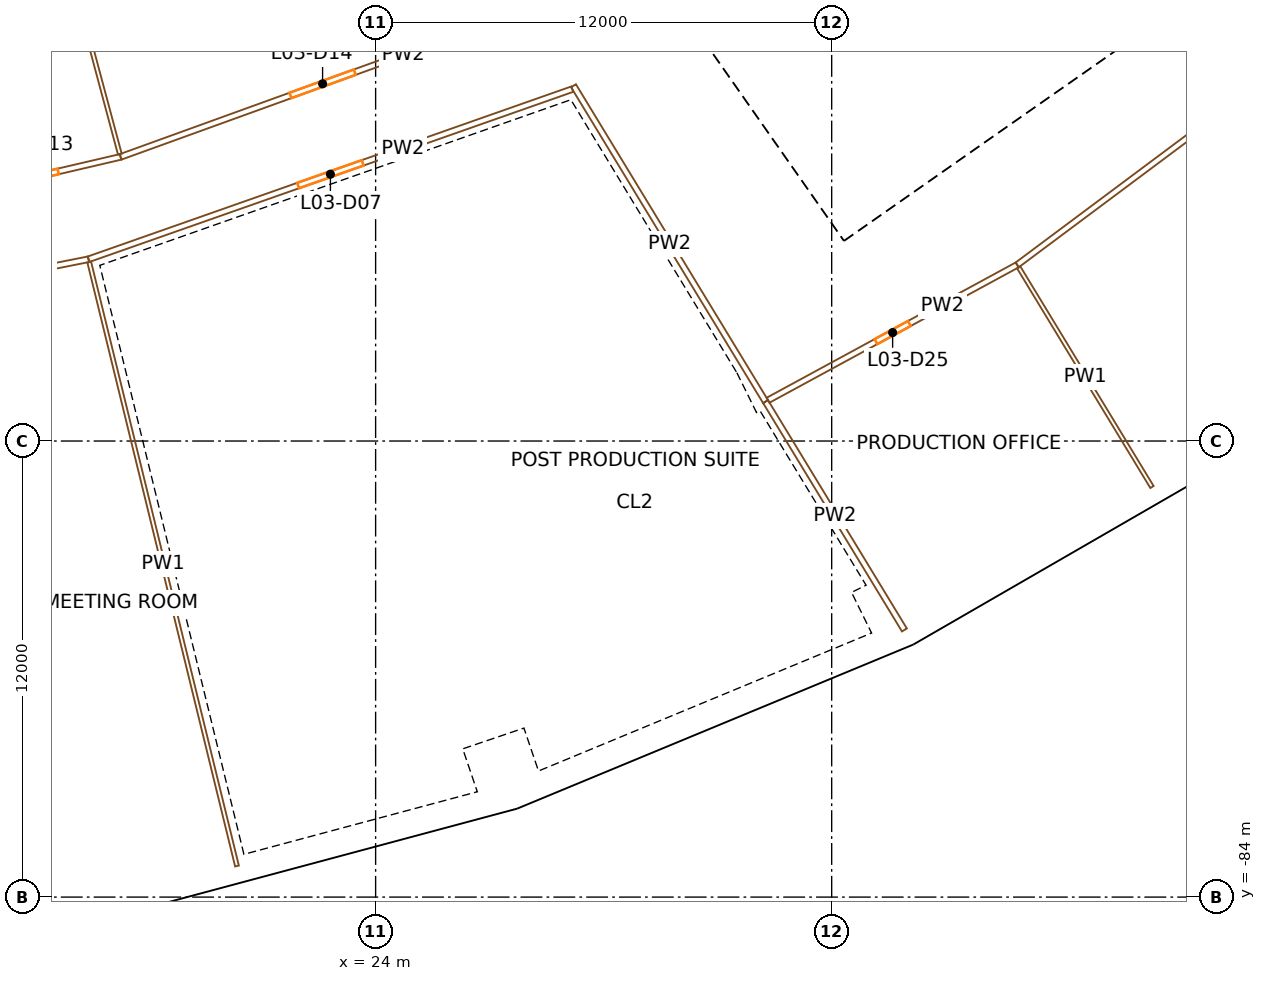
"""IFC4 building model, lengths in metres.
Left out: names, types, materials, properties, quantities, classifications, styles, units other than length and angle.
Written with IfcOpenShell. Run it as: python <this file> out.ifc"""

import sys

from ifc_helpers import new_model, si_unit, direction, frame, frame_2d, origin, origin_2d, place, context, subcontext, project, spatial, rectangle, extrude, element, fill, save


model = new_model("IFC4")
c1 = context("Model", 3, precision=1e-05, world=origin(), true_north=direction((0.0, 1.0)))
c2 = subcontext(c1, "Body", "Model", "MODEL_VIEW")
j1 = project(units=[si_unit("LENGTHUNIT", "METRE"), si_unit("PLANEANGLEUNIT", "RADIAN")], contexts=[c1])
p1 = place(None, origin())
s1 = spatial("IfcSite", under=j1, at=p1, CompositionType="ELEMENT")
p2 = place(p1, origin())
s2 = spatial("IfcBuilding", under=s1, at=p2, CompositionType="ELEMENT")
p3 = place(p2, frame((0.0, 0.0, 27.0)))
s3 = spatial("IfcBuildingStorey", under=s2, at=p3, CompositionType="ELEMENT", Elevation=27.0)
p4 = place(p3, frame((15.168, -76.256, 0.0), z_axis=(0.0, 0.0, 1.0), x_axis=(0.980785280403, 0.195090322016, 0.0)))
e1 = element("IfcColumn", 1, at=p4, inside=s3, PredefinedType="COLUMN", context=c2, shape_type="SweptSolid", body=[
    extrude(rectangle(XDim=1.4, YDim=1.8, at=origin_2d()), origin(), (0.0, 0.0, 1.0), 4.5),
])
p5 = place(p3, frame((16.631, -83.612, 0.0), z_axis=(0.0, 0.0, 1.0), x_axis=(0.980785280403, 0.195090322016, 0.0)))
e2 = element("IfcColumn", 2, at=p5, inside=s3, PredefinedType="COLUMN", context=c2, shape_type="SweptSolid", body=[
    extrude(rectangle(XDim=1.1, YDim=1.3, at=origin_2d()), origin(), (0.0, 0.0, 1.0), 4.5),
])
p6 = place(p3, frame((24.992, -73.624, 0.0), z_axis=(0.0, 0.0, 1.0), x_axis=(0.946930129495, 0.321439465303, 0.0)))
e3 = element("IfcColumn", 3, at=p6, inside=s3, PredefinedType="COLUMN", context=c2, shape_type="SweptSolid", body=[
    extrude(rectangle(XDim=1.4, YDim=1.8, at=origin_2d()), origin(), (0.0, 0.0, 1.0), 4.5),
])
p7 = place(p3, frame((27.403, -80.726, 0.0), z_axis=(0.0, 0.0, 1.0), x_axis=(0.946930129495, 0.321439465303, 0.0)))
e4 = element("IfcColumn", 4, at=p7, inside=s3, PredefinedType="COLUMN", context=c2, shape_type="SweptSolid", body=[
    extrude(rectangle(XDim=1.1, YDim=1.3, at=origin_2d()), origin(), (0.0, 0.0, 1.0), 4.5),
])
p8 = place(p3, frame((34.388, -69.732, 0.0), z_axis=(0.0, 0.0, 1.0), x_axis=(0.896872741533, 0.442288690219, 0.0)))
e5 = element("IfcColumn", 5, at=p8, inside=s3, PredefinedType="COLUMN", context=c2, shape_type="SweptSolid", body=[
    extrude(rectangle(XDim=1.4, YDim=1.8, at=origin_2d()), origin(), (0.0, 0.0, 1.0), 4.5),
])
p9 = place(p3, frame((37.705, -76.458, 0.0), z_axis=(0.0, 0.0, 1.0), x_axis=(0.896872741533, 0.442288690219, 0.0)))
e6 = element("IfcColumn", 6, at=p9, inside=s3, PredefinedType="COLUMN", context=c2, shape_type="SweptSolid", body=[
    extrude(rectangle(XDim=1.1, YDim=1.3, at=origin_2d()), origin(), (0.0, 0.0, 1.0), 4.5),
])
p10 = place(p3, frame((43.196, -64.647, 0.0), z_axis=(0.0, 0.0, 1.0), x_axis=(0.831469612303, 0.55557023302, 0.0)))
e7 = element("IfcColumn", 7, at=p10, inside=s3, PredefinedType="COLUMN", context=c2, shape_type="SweptSolid", body=[
    extrude(rectangle(XDim=1.4, YDim=1.8, at=origin_2d()), origin(), (0.0, 0.0, 1.0), 4.5),
])
p11 = place(p3, frame((36.717, -66.337, 0.0), z_axis=(0.0, 0.0, 1.0), x_axis=(-0.573577477574, 0.819151315216, 0.0)))
e8 = element("IfcWall", 8, at=p11, inside=s3, PredefinedType="SHEAR", context=c2, shape_type="SweptSolid", body=[
    extrude(rectangle(XDim=14.8, YDim=0.9, at=frame_2d((7.4, 0.0))), origin(), (0.0, 0.0, 1.0), 4.1),
])
p12 = place(p11, frame((6.2, 0.0, 0.0)))
e9 = element("IfcOpeningElement", 9, at=p12, cuts=e8, PredefinedType="OPENING", context=c2, shape_type="SweptSolid", body=[
    extrude(rectangle(XDim=2.4, YDim=2.1, at=frame_2d((1.2, 1.05))), frame((0.0, 0.46, 0.0), z_axis=(0.0, -1.0, 0.0), x_axis=(1.0, 0.0, 0.0)), (0.0, 0.0, 1.0), 0.92),
])
p13 = place(p3, frame((36.827, -65.71, 0.0), z_axis=(0.0, 0.0, 1.0), x_axis=(0.819153391756, 0.573574511963, 0.0)))
e10 = element("IfcWall", 10, at=p13, inside=s3, PredefinedType="SHEAR", context=c2, shape_type="SweptSolid", body=[
    extrude(rectangle(XDim=15.045, YDim=0.9, at=frame_2d((7.523, 0.0))), origin(), (0.0, 0.0, 1.0), 4.1),
])
p14 = place(p13, frame((1.05, 0.0, 0.0)))
e11 = element("IfcOpeningElement", 11, at=p14, cuts=e10, PredefinedType="OPENING", context=c2, shape_type="SweptSolid", body=[
    extrude(rectangle(XDim=1.0, YDim=2.1, at=frame_2d((0.5, 1.05))), frame((0.0, 0.46, 0.0), z_axis=(0.0, -1.0, 0.0), x_axis=(1.0, 0.0, 0.0)), (0.0, 0.0, 1.0), 0.92),
])
p15 = place(p13, frame((3.625, 0.0, 0.0)))
e12 = element("IfcOpeningElement", 12, at=p15, cuts=e10, PredefinedType="OPENING", context=c2, shape_type="SweptSolid", body=[
    extrude(rectangle(XDim=1.0, YDim=2.1, at=frame_2d((0.5, 1.05))), frame((0.0, 0.46, 0.0), z_axis=(0.0, -1.0, 0.0), x_axis=(1.0, 0.0, 0.0)), (0.0, 0.0, 1.0), 0.92),
])
p16 = place(p13, frame((6.075, 0.0, 0.0)))
e13 = element("IfcOpeningElement", 13, at=p16, cuts=e10, PredefinedType="OPENING", context=c2, shape_type="SweptSolid", body=[
    extrude(rectangle(XDim=1.0, YDim=2.1, at=frame_2d((0.5, 1.05))), frame((0.0, 0.46, 0.0), z_axis=(0.0, -1.0, 0.0), x_axis=(1.0, 0.0, 0.0)), (0.0, 0.0, 1.0), 0.92),
])
p17 = place(p13, frame((13.495, 0.0, 0.0)))
e14 = element("IfcOpeningElement", 14, at=p17, cuts=e10, PredefinedType="OPENING", context=c2, shape_type="SweptSolid", body=[
    extrude(rectangle(XDim=1.1, YDim=2.1, at=frame_2d((0.55, 1.05))), frame((0.0, 0.46, 0.0), z_axis=(0.0, -1.0, 0.0), x_axis=(1.0, 0.0, 0.0)), (0.0, 0.0, 1.0), 0.92),
])
p18 = place(p3, frame((35.221, -63.417, 0.0), z_axis=(0.0, 0.0, 1.0), x_axis=(0.819166993208, 0.573555086491, 0.0)))
e15 = element("IfcWall", 15, at=p18, inside=s3, PredefinedType="SOLIDWALL", context=c2, shape_type="SweptSolid", body=[
    extrude(rectangle(XDim=7.95, YDim=0.3, at=frame_2d((3.975, 0.0))), origin(), (0.0, 0.0, 1.0), 4.1),
])
p19 = place(p3, frame((37.929, -61.704, 0.0), z_axis=(0.0, 0.0, 1.0), x_axis=(0.573559170999, -0.819164133348, 0.0)))
e16 = element("IfcWall", 16, at=p19, inside=s3, PredefinedType="PLUMBINGWALL", context=c2, shape_type="SweptSolid", body=[
    extrude(rectangle(XDim=2.2, YDim=0.1, at=frame_2d((1.1, 0.0))), origin(), (0.0, 0.0, 1.0), 4.1),
])
p20 = place(p3, frame((39.485, -60.614, 0.0), z_axis=(0.0, 0.0, 1.0), x_axis=(0.573507030513, -0.819200638399, 0.0)))
e17 = element("IfcWall", 17, at=p20, inside=s3, PredefinedType="PLUMBINGWALL", context=c2, shape_type="SweptSolid", body=[
    extrude(rectangle(XDim=2.2, YDim=0.1, at=frame_2d((1.1, 0.0))), origin(), (0.0, 0.0, 1.0), 4.1),
])
p21 = place(p3, frame((16.754, -84.379, 0.0), z_axis=(0.0, 0.0, 1.0), x_axis=(0.965923678926, 0.258827059038, 0.0)))
e18 = element("IfcWall", 18, at=p21, inside=s3, PredefinedType="SOLIDWALL", context=c2, shape_type="SweptSolid", body=[
    extrude(rectangle(XDim=11.312, YDim=0.45, at=frame_2d((5.656, 0.0))), origin(), (0.0, 0.0, 1.0), 3.2),
])
p22 = place(p21, frame((4.006, 0.0, 0.9)))
e19 = element("IfcOpeningElement", 19, at=p22, cuts=e18, PredefinedType="OPENING", context=c2, shape_type="SweptSolid", body=[
    extrude(rectangle(XDim=1.2, YDim=2.15, at=frame_2d((0.6, 1.075))), frame((0.0, 0.235, 0.0), z_axis=(0.0, -1.0, 0.0), x_axis=(1.0, 0.0, 0.0)), (0.0, 0.0, 1.0), 0.47),
])
p23 = place(p21, frame((6.106, 0.0, 0.9)))
e20 = element("IfcOpeningElement", 20, at=p23, cuts=e18, PredefinedType="OPENING", context=c2, shape_type="SweptSolid", body=[
    extrude(rectangle(XDim=1.2, YDim=2.15, at=frame_2d((0.6, 1.075))), frame((0.0, 0.235, 0.0), z_axis=(0.0, -1.0, 0.0), x_axis=(1.0, 0.0, 0.0)), (0.0, 0.0, 1.0), 0.47),
])
p24 = place(p3, frame((27.706, -81.437, 0.0), z_axis=(0.0, 0.0, 1.0), x_axis=(0.923874126662, 0.382696482978, 0.0)))
e21 = element("IfcWall", 21, at=p24, inside=s3, PredefinedType="SOLIDWALL", context=c2, shape_type="SweptSolid", body=[
    extrude(rectangle(XDim=11.135, YDim=0.45, at=frame_2d((5.567, 0.0))), origin(), (0.0, 0.0, 1.0), 3.2),
])
p25 = place(p24, frame((3.917, 0.0, 0.9)))
e22 = element("IfcOpeningElement", 22, at=p25, cuts=e21, PredefinedType="OPENING", context=c2, shape_type="SweptSolid", body=[
    extrude(rectangle(XDim=1.2, YDim=2.15, at=frame_2d((0.6, 1.075))), frame((0.0, 0.235, 0.0), z_axis=(0.0, -1.0, 0.0), x_axis=(1.0, 0.0, 0.0)), (0.0, 0.0, 1.0), 0.47),
])
p26 = place(p24, frame((6.017, 0.0, 0.9)))
e23 = element("IfcOpeningElement", 23, at=p26, cuts=e21, PredefinedType="OPENING", context=c2, shape_type="SweptSolid", body=[
    extrude(rectangle(XDim=1.2, YDim=2.15, at=frame_2d((0.6, 1.075))), frame((0.0, 0.235, 0.0), z_axis=(0.0, -1.0, 0.0), x_axis=(1.0, 0.0, 0.0)), (0.0, 0.0, 1.0), 0.47),
])
p27 = place(p3, frame((38.022, -77.168, 0.0), z_axis=(0.0, 0.0, 1.0), x_axis=(0.866024577697, 0.500001430823, 0.0)))
e24 = element("IfcWall", 24, at=p27, inside=s3, PredefinedType="SOLIDWALL", context=c2, shape_type="SweptSolid", body=[
    extrude(rectangle(XDim=11.312, YDim=0.45, at=frame_2d((5.656, 0.0))), origin(), (0.0, 0.0, 1.0), 3.2),
])
p28 = place(p27, frame((4.006, 0.0, 0.9)))
e25 = element("IfcOpeningElement", 25, at=p28, cuts=e24, PredefinedType="OPENING", context=c2, shape_type="SweptSolid", body=[
    extrude(rectangle(XDim=1.2, YDim=2.15, at=frame_2d((0.6, 1.075))), frame((0.0, 0.235, 0.0), z_axis=(0.0, -1.0, 0.0), x_axis=(1.0, 0.0, 0.0)), (0.0, 0.0, 1.0), 0.47),
])
p29 = place(p27, frame((6.106, 0.0, 0.9)))
e26 = element("IfcOpeningElement", 26, at=p29, cuts=e24, PredefinedType="OPENING", context=c2, shape_type="SweptSolid", body=[
    extrude(rectangle(XDim=1.2, YDim=2.15, at=frame_2d((0.6, 1.075))), frame((0.0, 0.235, 0.0), z_axis=(0.0, -1.0, 0.0), x_axis=(1.0, 0.0, 0.0)), (0.0, 0.0, 1.0), 0.47),
])
p30 = place(p3, frame((16.446, -67.217, 0.0), z_axis=(0.0, 0.0, 1.0), x_axis=(-0.980785582749, -0.195088802015, 0.0)))
e27 = element("IfcWall", 27, at=p30, inside=s3, PredefinedType="PARTITIONING", context=c2, shape_type="SweptSolid", body=[
    extrude(rectangle(XDim=6.033, YDim=0.15, at=frame_2d((3.017, 0.0))), origin(), (0.0, 0.0, 1.0), 3.1),
])
p31 = place(p30, frame((2.517, 0.0, 0.0)))
e28 = element("IfcOpeningElement", 28, at=p31, cuts=e27, PredefinedType="OPENING", context=c2, shape_type="SweptSolid", body=[
    extrude(rectangle(XDim=1.0, YDim=2.1, at=frame_2d((0.5, 1.05))), frame((0.0, 0.085, 0.0), z_axis=(0.0, -1.0, 0.0), x_axis=(1.0, 0.0, 0.0)), (0.0, 0.0, 1.0), 0.17),
])
p32 = place(p3, frame((12.965, -48.386, 0.0), z_axis=(0.0, 0.0, 1.0), x_axis=(0.258824622624, -0.965924331779, 0.0)))
e29 = element("IfcWall", 29, at=p32, inside=s3, PredefinedType="PARTITIONING", context=c2, shape_type="SweptSolid", body=[
    extrude(rectangle(XDim=16.632, YDim=0.1, at=frame_2d((8.316, 0.0))), origin(), (0.0, 0.0, 1.0), 3.1),
])
p33 = place(p3, frame((13.032, -65.516, 0.0), z_axis=(0.0, 0.0, 1.0), x_axis=(0.973886095728, 0.227037161159, 0.0)))
e30 = element("IfcWall", 30, at=p33, inside=s3, PredefinedType="PARTITIONING", context=c2, shape_type="SweptSolid", body=[
    extrude(rectangle(XDim=4.371, YDim=0.15, at=frame_2d((2.186, 0.0))), origin(), (0.0, 0.0, 1.0), 3.1),
])
p34 = place(p33, frame((1.686, 0.0, 0.0)))
e31 = element("IfcOpeningElement", 31, at=p34, cuts=e30, PredefinedType="OPENING", context=c2, shape_type="SweptSolid", body=[
    extrude(rectangle(XDim=1.0, YDim=2.1, at=frame_2d((0.5, 1.05))), frame((0.0, 0.085, 0.0), z_axis=(0.0, -1.0, 0.0), x_axis=(1.0, 0.0, 0.0)), (0.0, 0.0, 1.0), 0.17),
])
p35 = place(p3, frame((29.175, -62.741, 0.0), z_axis=(0.0, 0.0, 1.0), x_axis=(-0.94336986797, -0.33174281033, 0.0)))
e32 = element("IfcWall", 32, at=p35, inside=s3, PredefinedType="PARTITIONING", context=c2, shape_type="SweptSolid", body=[
    extrude(rectangle(XDim=13.493, YDim=0.15, at=frame_2d((6.746, 0.0))), origin(), (0.0, 0.0, 1.0), 3.1),
])
p36 = place(p35, frame((5.846, 0.0, 0.0)))
e33 = element("IfcOpeningElement", 33, at=p36, cuts=e32, PredefinedType="OPENING", context=c2, shape_type="SweptSolid", body=[
    extrude(rectangle(XDim=1.8, YDim=2.1, at=frame_2d((0.9, 1.05))), frame((0.0, 0.085, 0.0), z_axis=(0.0, -1.0, 0.0), x_axis=(1.0, 0.0, 0.0)), (0.0, 0.0, 1.0), 0.17),
])
p37 = place(p3, frame((17.289, -64.524, 0.0), z_axis=(0.0, 0.0, 1.0), x_axis=(0.940369024046, 0.340155991589, 0.0)))
e34 = element("IfcWall", 34, at=p37, inside=s3, PredefinedType="PARTITIONING", context=c2, shape_type="SweptSolid", body=[
    extrude(rectangle(XDim=11.305, YDim=0.15, at=frame_2d((5.652, 0.0))), origin(), (0.0, 0.0, 1.0), 3.1),
])
p38 = place(p37, frame((4.752, 0.0, 0.0)))
e35 = element("IfcOpeningElement", 35, at=p38, cuts=e34, PredefinedType="OPENING", context=c2, shape_type="SweptSolid", body=[
    extrude(rectangle(XDim=1.8, YDim=2.1, at=frame_2d((0.9, 1.05))), frame((0.0, 0.085, 0.0), z_axis=(0.0, -1.0, 0.0), x_axis=(1.0, 0.0, 0.0)), (0.0, 0.0, 1.0), 0.17),
])
p39 = place(p3, frame((20.352, -83.182, 0.0), z_axis=(0.0, 0.0, 1.0), x_axis=(-0.23765209547, 0.971350339228, 0.0)))
e36 = element("IfcWall", 36, at=p39, inside=s3, PredefinedType="PARTITIONING", context=c2, shape_type="SweptSolid", body=[
    extrude(rectangle(XDim=16.361, YDim=0.1, at=frame_2d((8.18, 0.0))), origin(), (0.0, 0.0, 1.0), 3.1),
])
p40 = place(p3, frame((29.207, -62.652, 0.0), z_axis=(0.0, 0.0, 1.0), x_axis=(0.519573423316, -0.854425805897, 0.0)))
e37 = element("IfcWall", 37, at=p40, inside=s3, PredefinedType="PARTITIONING", context=c2, shape_type="SweptSolid", body=[
    extrude(rectangle(XDim=9.726, YDim=0.15, at=frame_2d((4.863, 0.0))), origin(), (0.0, 0.0, 1.0), 3.1),
])
p41 = place(p3, frame((34.26, -70.963, 0.0), z_axis=(0.0, 0.0, 1.0), x_axis=(0.519582317334, -0.854420397412, 0.0)))
e38 = element("IfcWall", 38, at=p41, inside=s3, PredefinedType="PARTITIONING", context=c2, shape_type="SweptSolid", body=[
    extrude(rectangle(XDim=7.032, YDim=0.15, at=frame_2d((3.516, 0.0))), origin(), (0.0, 0.0, 1.0), 3.1),
])
p42 = place(p3, frame((40.881, -67.366, 0.0), z_axis=(0.0, 0.0, 1.0), x_axis=(-0.87872597875, -0.477326569835, 0.0)))
e39 = element("IfcWall", 39, at=p42, inside=s3, PredefinedType="PARTITIONING", context=c2, shape_type="SweptSolid", body=[
    extrude(rectangle(XDim=7.46, YDim=0.15, at=frame_2d((3.73, 0.0))), origin(), (0.0, 0.0, 1.0), 3.1),
])
p43 = place(p42, frame((3.23, 0.0, 0.0)))
e40 = element("IfcOpeningElement", 40, at=p43, cuts=e39, PredefinedType="OPENING", context=c2, shape_type="SweptSolid", body=[
    extrude(rectangle(XDim=1.0, YDim=2.1, at=frame_2d((0.5, 1.05))), frame((0.0, 0.085, 0.0), z_axis=(0.0, -1.0, 0.0), x_axis=(1.0, 0.0, 0.0)), (0.0, 0.0, 1.0), 0.17),
])
p44 = place(p3, frame((52.875, -58.417, 0.0), z_axis=(0.0, 0.0, 1.0), x_axis=(-0.801483412858, -0.598017005539, 0.0)))
e41 = element("IfcWall", 41, at=p44, inside=s3, PredefinedType="PARTITIONING", context=c2, shape_type="SweptSolid", body=[
    extrude(rectangle(XDim=14.965, YDim=0.15, at=frame_2d((7.483, 0.0))), origin(), (0.0, 0.0, 1.0), 3.1),
])
p45 = place(p44, frame((6.983, 0.0, 0.0)))
e42 = element("IfcOpeningElement", 42, at=p45, cuts=e41, PredefinedType="OPENING", context=c2, shape_type="SweptSolid", body=[
    extrude(rectangle(XDim=1.0, YDim=2.1, at=frame_2d((0.5, 1.05))), frame((0.0, 0.085, 0.0), z_axis=(0.0, -1.0, 0.0), x_axis=(1.0, 0.0, 0.0)), (0.0, 0.0, 1.0), 0.17),
])
p46 = place(p3, frame((44.428, -73.21, 0.0), z_axis=(0.0, 0.0, 1.0), x_axis=(-0.518790606157, 0.85490134341, 0.0)))
e43 = element("IfcWall", 43, at=p46, inside=s3, PredefinedType="PARTITIONING", context=c2, shape_type="SweptSolid", body=[
    extrude(rectangle(XDim=6.761, YDim=0.1, at=frame_2d((3.38, 0.0))), origin(), (0.0, 0.0, 1.0), 3.1),
])
p47 = place(p14, origin())
e44 = element("IfcDoor", 44, at=p47, inside=s3, OperationType="SINGLE_SWING_RIGHT", PredefinedType="DOOR", context=c2, shape_type="SweptSolid", body=[
    extrude(rectangle(XDim=1.0, YDim=2.1, at=frame_2d((0.5, 1.05))), frame((0.0, 0.025, 0.0), z_axis=(0.0, -1.0, 0.0), x_axis=(1.0, 0.0, 0.0)), (0.0, 0.0, 1.0), 0.05),
])
fill(e11, e44)
p48 = place(p15, origin())
e45 = element("IfcDoor", 45, at=p48, inside=s3, OperationType="SINGLE_SWING_LEFT", PredefinedType="DOOR", context=c2, shape_type="SweptSolid", body=[
    extrude(rectangle(XDim=1.0, YDim=2.1, at=frame_2d((0.5, 1.05))), frame((0.0, 0.025, 0.0), z_axis=(0.0, -1.0, 0.0), x_axis=(1.0, 0.0, 0.0)), (0.0, 0.0, 1.0), 0.05),
])
fill(e12, e45)
p49 = place(p16, origin())
e46 = element("IfcDoor", 46, at=p49, inside=s3, OperationType="SINGLE_SWING_RIGHT", PredefinedType="DOOR", context=c2, shape_type="SweptSolid", body=[
    extrude(rectangle(XDim=1.0, YDim=2.1, at=frame_2d((0.5, 1.05))), frame((0.0, 0.025, 0.0), z_axis=(0.0, -1.0, 0.0), x_axis=(1.0, 0.0, 0.0)), (0.0, 0.0, 1.0), 0.05),
])
fill(e13, e46)
p50 = place(p22, origin())
e47 = element("IfcWindow", 47, at=p50, inside=s3, PartitioningType="SINGLE_PANEL", PredefinedType="WINDOW", context=c2, shape_type="SweptSolid", body=[
    extrude(rectangle(XDim=1.2, YDim=2.15, at=frame_2d((0.6, 1.075))), frame((0.0, 0.03, 0.0), z_axis=(0.0, -1.0, 0.0), x_axis=(1.0, 0.0, 0.0)), (0.0, 0.0, 1.0), 0.06),
])
fill(e19, e47)
p51 = place(p23, origin())
e48 = element("IfcWindow", 48, at=p51, inside=s3, PartitioningType="SINGLE_PANEL", PredefinedType="WINDOW", context=c2, shape_type="SweptSolid", body=[
    extrude(rectangle(XDim=1.2, YDim=2.15, at=frame_2d((0.6, 1.075))), frame((0.0, 0.03, 0.0), z_axis=(0.0, -1.0, 0.0), x_axis=(1.0, 0.0, 0.0)), (0.0, 0.0, 1.0), 0.06),
])
fill(e20, e48)
p52 = place(p25, origin())
e49 = element("IfcWindow", 49, at=p52, inside=s3, PartitioningType="SINGLE_PANEL", PredefinedType="WINDOW", context=c2, shape_type="SweptSolid", body=[
    extrude(rectangle(XDim=1.2, YDim=2.15, at=frame_2d((0.6, 1.075))), frame((0.0, 0.03, 0.0), z_axis=(0.0, -1.0, 0.0), x_axis=(1.0, 0.0, 0.0)), (0.0, 0.0, 1.0), 0.06),
])
fill(e22, e49)
p53 = place(p26, origin())
e50 = element("IfcWindow", 50, at=p53, inside=s3, PartitioningType="SINGLE_PANEL", PredefinedType="WINDOW", context=c2, shape_type="SweptSolid", body=[
    extrude(rectangle(XDim=1.2, YDim=2.15, at=frame_2d((0.6, 1.075))), frame((0.0, 0.03, 0.0), z_axis=(0.0, -1.0, 0.0), x_axis=(1.0, 0.0, 0.0)), (0.0, 0.0, 1.0), 0.06),
])
fill(e23, e50)
p54 = place(p28, origin())
e51 = element("IfcWindow", 51, at=p54, inside=s3, PartitioningType="SINGLE_PANEL", PredefinedType="WINDOW", context=c2, shape_type="SweptSolid", body=[
    extrude(rectangle(XDim=1.2, YDim=2.15, at=frame_2d((0.6, 1.075))), frame((0.0, 0.03, 0.0), z_axis=(0.0, -1.0, 0.0), x_axis=(1.0, 0.0, 0.0)), (0.0, 0.0, 1.0), 0.06),
])
fill(e25, e51)
p55 = place(p29, origin())
e52 = element("IfcWindow", 52, at=p55, inside=s3, PartitioningType="SINGLE_PANEL", PredefinedType="WINDOW", context=c2, shape_type="SweptSolid", body=[
    extrude(rectangle(XDim=1.2, YDim=2.15, at=frame_2d((0.6, 1.075))), frame((0.0, 0.03, 0.0), z_axis=(0.0, -1.0, 0.0), x_axis=(1.0, 0.0, 0.0)), (0.0, 0.0, 1.0), 0.06),
])
fill(e26, e52)
p56 = place(p36, origin())
e53 = element("IfcDoor", 53, at=p56, inside=s3, OperationType="DOUBLE_DOOR_SINGLE_SWING", PredefinedType="DOOR", context=c2, shape_type="SweptSolid", body=[
    extrude(rectangle(XDim=1.8, YDim=2.1, at=frame_2d((0.9, 1.05))), frame((0.0, 0.025, 0.0), z_axis=(0.0, -1.0, 0.0), x_axis=(1.0, 0.0, 0.0)), (0.0, 0.0, 1.0), 0.05),
])
fill(e33, e53)
p57 = place(p34, origin())
e54 = element("IfcDoor", 54, at=p57, inside=s3, OperationType="SINGLE_SWING_RIGHT", PredefinedType="DOOR", context=c2, shape_type="SweptSolid", body=[
    extrude(rectangle(XDim=1.0, YDim=2.1, at=frame_2d((0.5, 1.05))), frame((0.0, 0.025, 0.0), z_axis=(0.0, -1.0, 0.0), x_axis=(1.0, 0.0, 0.0)), (0.0, 0.0, 1.0), 0.05),
])
fill(e31, e54)
p58 = place(p38, origin())
e55 = element("IfcDoor", 55, at=p58, inside=s3, OperationType="DOUBLE_DOOR_SINGLE_SWING", PredefinedType="DOOR", context=c2, shape_type="SweptSolid", body=[
    extrude(rectangle(XDim=1.8, YDim=2.1, at=frame_2d((0.9, 1.05))), frame((0.0, 0.025, 0.0), z_axis=(0.0, -1.0, 0.0), x_axis=(1.0, 0.0, 0.0)), (0.0, 0.0, 1.0), 0.05),
])
fill(e35, e55)
p59 = place(p43, origin())
e56 = element("IfcDoor", 56, at=p59, inside=s3, OperationType="SINGLE_SWING_RIGHT", PredefinedType="DOOR", context=c2, shape_type="SweptSolid", body=[
    extrude(rectangle(XDim=1.0, YDim=2.1, at=frame_2d((0.5, 1.05))), frame((0.0, 0.025, 0.0), z_axis=(0.0, -1.0, 0.0), x_axis=(1.0, 0.0, 0.0)), (0.0, 0.0, 1.0), 0.05),
])
fill(e40, e56)
save(model, sys.argv[1])
